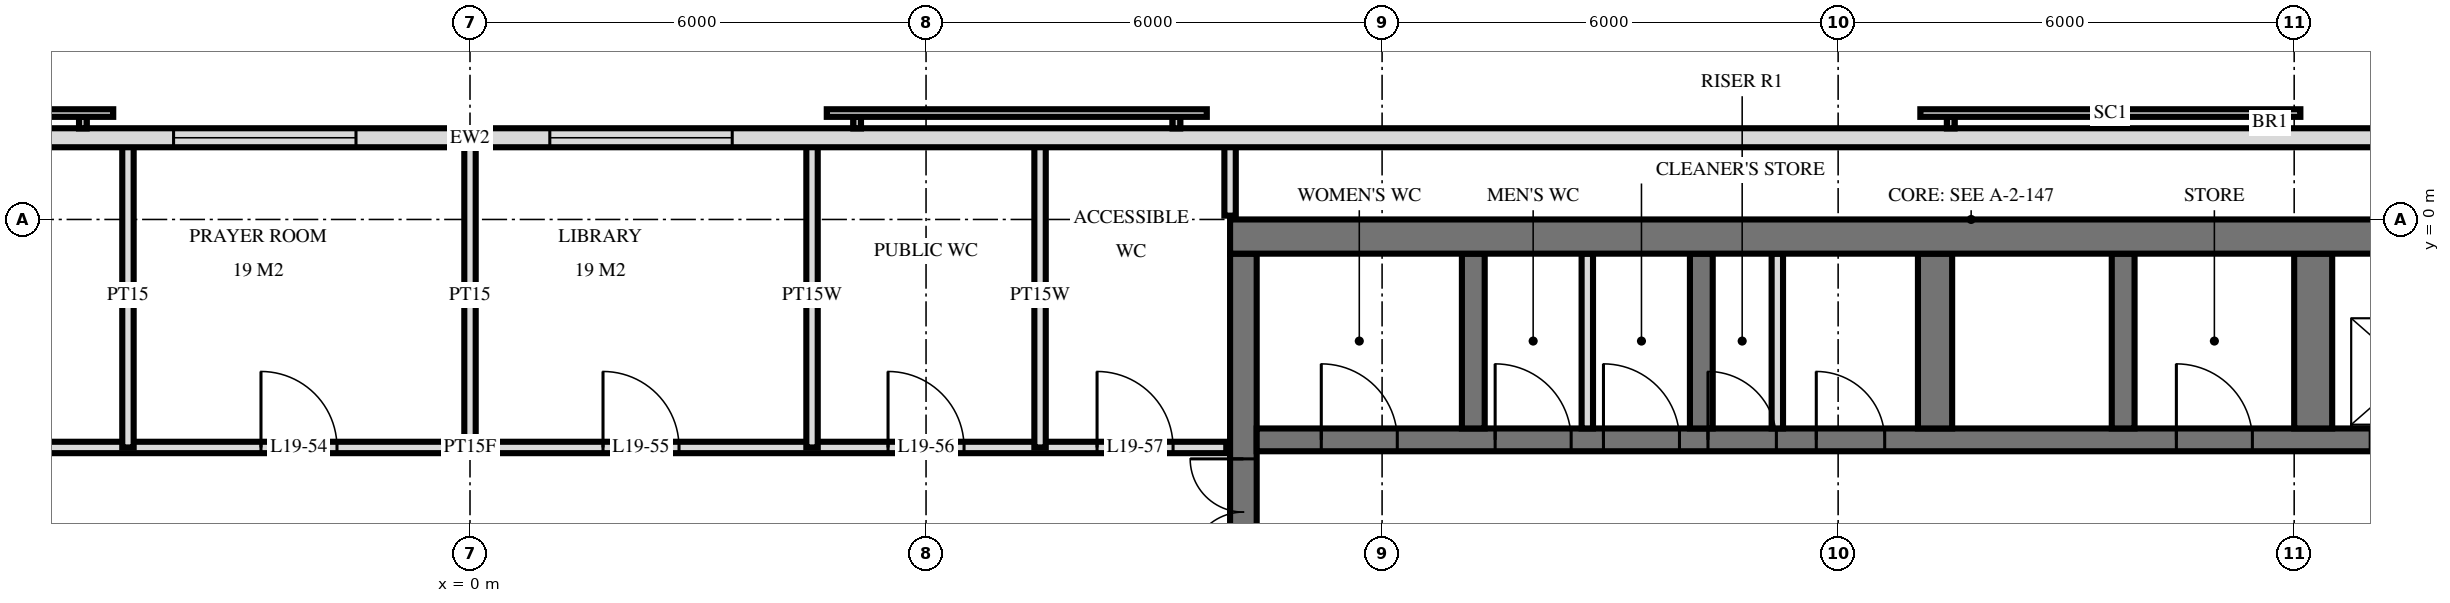
"""IFC4 building model, lengths in metres.
Left out: names, types, materials, properties, quantities, classifications, styles, units other than length and angle.
Written with IfcOpenShell. Run it as: python <this file> out.ifc"""

import sys

from ifc_helpers import new_model, si_unit, direction, frame, frame_2d, origin, place, context, subcontext, project, spatial, rectangle, extrude, element, fill, save


model = new_model("IFC4")
c1 = context("Model", 3, precision=1e-05, world=origin(), true_north=direction((0.0, 1.0)))
c2 = subcontext(c1, "Body", "Model", "MODEL_VIEW")
j1 = project(units=[si_unit("LENGTHUNIT", "METRE"), si_unit("PLANEANGLEUNIT", "RADIAN")], contexts=[c1])
p1 = place(None, origin())
s1 = spatial("IfcSite", under=j1, at=p1, CompositionType="ELEMENT")
p2 = place(p1, origin())
s2 = spatial("IfcBuilding", under=s1, at=p2, CompositionType="ELEMENT")
p3 = place(p2, frame((0.0, 0.0, 78.0)))
s3 = spatial("IfcBuildingStorey", under=s2, at=p3, CompositionType="ELEMENT", Elevation=78.0)
p4 = place(p3, frame((10.0, -0.225, 0.0), z_axis=(0.0, 0.0, 1.0), x_axis=(1.0, 0.0, 0.0)))
e1 = element("IfcWall", 1, at=p4, inside=s3, PredefinedType="SHEAR", context=c2, shape_type="SweptSolid", body=[
    extrude(rectangle(XDim=19.5, YDim=0.45, at=frame_2d((9.75, 0.0))), origin(), (0.0, 0.0, 1.0), 3.6),
])
p5 = place(p3, frame((10.175, -14.55, 0.0), z_axis=(0.0, 0.0, 1.0), x_axis=(0.0, 1.0, 0.0)))
e2 = element("IfcWall", 2, at=p5, inside=s3, PredefinedType="SHEAR", context=c2, shape_type="SweptSolid", body=[
    extrude(rectangle(XDim=14.1, YDim=0.35, at=frame_2d((7.05, 0.0))), origin(), (0.0, 0.0, 1.0), 3.6),
])
p6 = place(p5, frame((8.4, 0.0, 0.0)))
e3 = element("IfcOpeningElement", 3, at=p6, cuts=e2, PredefinedType="OPENING", context=c2, shape_type="SweptSolid", body=[
    extrude(rectangle(XDim=1.4, YDim=2.4, at=frame_2d((0.7, 1.2))), frame((0.0, 0.185, 0.0), z_axis=(0.0, -1.0, 0.0), x_axis=(1.0, 0.0, 0.0)), (0.0, 0.0, 1.0), 0.37),
])
p7 = place(p5, frame((10.0, 0.0, 0.0)))
e4 = element("IfcOpeningElement", 4, at=p7, cuts=e2, PredefinedType="OPENING", context=c2, shape_type="SweptSolid", body=[
    extrude(rectangle(XDim=1.4, YDim=2.4, at=frame_2d((0.7, 1.2))), frame((0.0, 0.185, 0.0), z_axis=(0.0, -1.0, 0.0), x_axis=(1.0, 0.0, 0.0)), (0.0, 0.0, 1.0), 0.37),
])
p8 = place(p5, frame((4.0, 0.0, 0.0)))
e5 = element("IfcOpeningElement", 5, at=p8, cuts=e2, PredefinedType="OPENING", context=c2, shape_type="SweptSolid", body=[
    extrude(rectangle(XDim=1.2, YDim=2.1, at=frame_2d((0.6, 1.05))), frame((0.0, 0.185, 0.0), z_axis=(0.0, -1.0, 0.0), x_axis=(1.0, 0.0, 0.0)), (0.0, 0.0, 1.0), 0.37),
])
p9 = place(p3, frame((10.35, -2.9, 0.0), z_axis=(0.0, 0.0, 1.0), x_axis=(1.0, 0.0, 0.0)))
e6 = element("IfcWall", 6, at=p9, inside=s3, PredefinedType="SHEAR", context=c2, shape_type="SweptSolid", body=[
    extrude(rectangle(XDim=18.7, YDim=0.3, at=frame_2d((9.35, 0.0))), origin(), (0.0, 0.0, 1.0), 3.6),
])
p10 = place(p9, frame((14.65, 0.0, 0.0)))
e7 = element("IfcOpeningElement", 7, at=p10, cuts=e6, PredefinedType="OPENING", context=c2, shape_type="SweptSolid", body=[
    extrude(rectangle(XDim=1.1, YDim=2.1, at=frame_2d((0.55, 1.05))), frame((0.0, 0.16, 0.0), z_axis=(0.0, -1.0, 0.0), x_axis=(1.0, 0.0, 0.0)), (0.0, 0.0, 1.0), 0.32),
])
p11 = place(p9, frame((17.05, 0.0, 0.0)))
e8 = element("IfcOpeningElement", 8, at=p11, cuts=e6, PredefinedType="OPENING", context=c2, shape_type="SweptSolid", body=[
    extrude(rectangle(XDim=1.1, YDim=2.1, at=frame_2d((0.55, 1.05))), frame((0.0, 0.16, 0.0), z_axis=(0.0, -1.0, 0.0), x_axis=(1.0, 0.0, 0.0)), (0.0, 0.0, 1.0), 0.32),
])
p12 = place(p9, frame((5.938, 0.0, 0.0)))
e9 = element("IfcOpeningElement", 9, at=p12, cuts=e6, PredefinedType="OPENING", context=c2, shape_type="SweptSolid", body=[
    extrude(rectangle(XDim=0.9, YDim=2.1, at=frame_2d((0.45, 1.05))), frame((0.0, 0.16, 0.0), z_axis=(0.0, -1.0, 0.0), x_axis=(1.0, 0.0, 0.0)), (0.0, 0.0, 1.0), 0.32),
])
p13 = place(p9, frame((7.363, 0.0, 0.0)))
e10 = element("IfcOpeningElement", 10, at=p13, cuts=e6, PredefinedType="OPENING", context=c2, shape_type="SweptSolid", body=[
    extrude(rectangle(XDim=0.9, YDim=2.1, at=frame_2d((0.45, 1.05))), frame((0.0, 0.16, 0.0), z_axis=(0.0, -1.0, 0.0), x_axis=(1.0, 0.0, 0.0)), (0.0, 0.0, 1.0), 0.32),
])
p14 = place(p9, frame((0.85, 0.0, 0.0)))
e11 = element("IfcOpeningElement", 11, at=p14, cuts=e6, PredefinedType="OPENING", context=c2, shape_type="SweptSolid", body=[
    extrude(rectangle(XDim=1.0, YDim=2.1, at=frame_2d((0.5, 1.05))), frame((0.0, 0.16, 0.0), z_axis=(0.0, -1.0, 0.0), x_axis=(1.0, 0.0, 0.0)), (0.0, 0.0, 1.0), 0.32),
])
p15 = place(p9, frame((3.137, 0.0, 0.0)))
e12 = element("IfcOpeningElement", 12, at=p15, cuts=e6, PredefinedType="OPENING", context=c2, shape_type="SweptSolid", body=[
    extrude(rectangle(XDim=1.0, YDim=2.1, at=frame_2d((0.5, 1.05))), frame((0.0, 0.16, 0.0), z_axis=(0.0, -1.0, 0.0), x_axis=(1.0, 0.0, 0.0)), (0.0, 0.0, 1.0), 0.32),
])
p16 = place(p9, frame((4.562, 0.0, 0.0)))
e13 = element("IfcOpeningElement", 13, at=p16, cuts=e6, PredefinedType="OPENING", context=c2, shape_type="SweptSolid", body=[
    extrude(rectangle(XDim=1.0, YDim=2.1, at=frame_2d((0.5, 1.05))), frame((0.0, 0.16, 0.0), z_axis=(0.0, -1.0, 0.0), x_axis=(1.0, 0.0, 0.0)), (0.0, 0.0, 1.0), 0.32),
])
p17 = place(p9, frame((12.1, 0.0, 0.0)))
e14 = element("IfcOpeningElement", 14, at=p17, cuts=e6, PredefinedType="OPENING", context=c2, shape_type="SweptSolid", body=[
    extrude(rectangle(XDim=1.0, YDim=2.1, at=frame_2d((0.5, 1.05))), frame((0.0, 0.16, 0.0), z_axis=(0.0, -1.0, 0.0), x_axis=(1.0, 0.0, 0.0)), (0.0, 0.0, 1.0), 0.32),
])
for number, where, z_axis, x_axis in (
    (15, (13.2, -2.75, 0.0), (0.0, 0.0, 1.0), (0.0, 1.0, 0.0)),
    (16, (16.2, -2.75, 0.0), (0.0, 0.0, 1.0), (0.0, 1.0, 0.0)),
):
    element("IfcWall", number, at=place(p3, frame(where, z_axis=z_axis, x_axis=x_axis)), inside=s3, PredefinedType="SHEAR", context=c2, shape_type="SweptSolid", body=[
        extrude(rectangle(XDim=2.3, YDim=0.3, at=frame_2d((1.15, 0.0))), origin(), (0.0, 0.0, 1.0), 3.6),
    ])
p18 = place(p3, frame((19.275, -2.75, 0.0), z_axis=(0.0, 0.0, 1.0), x_axis=(0.0, 1.0, 0.0)))
e17 = element("IfcWall", 17, at=p18, inside=s3, PredefinedType="SHEAR", context=c2, shape_type="SweptSolid", body=[
    extrude(rectangle(XDim=2.3, YDim=0.45, at=frame_2d((1.15, 0.0))), origin(), (0.0, 0.0, 1.0), 3.6),
])
p19 = place(p3, frame((21.75, -2.75, 0.0), z_axis=(0.0, 0.0, 1.0), x_axis=(0.0, 1.0, 0.0)))
e18 = element("IfcWall", 18, at=p19, inside=s3, PredefinedType="SHEAR", context=c2, shape_type="SweptSolid", body=[
    extrude(rectangle(XDim=2.3, YDim=0.3, at=frame_2d((1.15, 0.0))), origin(), (0.0, 0.0, 1.0), 3.6),
])
p20 = place(p3, frame((24.25, -2.75, 0.0), z_axis=(0.0, 0.0, 1.0), x_axis=(0.0, 1.0, 0.0)))
e19 = element("IfcWall", 19, at=p20, inside=s3, PredefinedType="SHEAR", context=c2, shape_type="SweptSolid", body=[
    extrude(rectangle(XDim=2.3, YDim=0.5, at=frame_2d((1.15, 0.0))), origin(), (0.0, 0.0, 1.0), 3.6),
])
p21 = place(p3, frame((28.775, 1.075, 0.0), z_axis=(0.0, 0.0, 1.0), x_axis=(-1.0, 0.0, 0.0)))
e20 = element("IfcWall", 20, at=p21, inside=s3, PredefinedType="SOLIDWALL", context=c2, shape_type="SweptSolid", body=[
    extrude(rectangle(XDim=57.551, YDim=0.25, at=frame_2d((28.775, 0.0))), origin(), (0.0, 0.0, 1.0), 3.32),
])
p22 = place(p21, frame((25.325, 0.0, 0.3)))
e21 = element("IfcOpeningElement", 21, at=p22, cuts=e20, PredefinedType="OPENING", context=c2, shape_type="SweptSolid", body=[
    extrude(rectangle(XDim=2.4, YDim=2.1, at=frame_2d((1.2, 1.05))), frame((0.0, 0.135, 0.0), z_axis=(0.0, -1.0, 0.0), x_axis=(1.0, 0.0, 0.0)), (0.0, 0.0, 1.0), 0.27),
])
p23 = place(p21, frame((30.275, 0.0, 0.3)))
e22 = element("IfcOpeningElement", 22, at=p23, cuts=e20, PredefinedType="OPENING", context=c2, shape_type="SweptSolid", body=[
    extrude(rectangle(XDim=2.4, YDim=2.1, at=frame_2d((1.2, 1.05))), frame((0.0, 0.135, 0.0), z_axis=(0.0, -1.0, 0.0), x_axis=(1.0, 0.0, 0.0)), (0.0, 0.0, 1.0), 0.27),
])
p24 = place(p21, frame((34.825, 0.0, 0.3)))
e23 = element("IfcOpeningElement", 23, at=p24, cuts=e20, PredefinedType="OPENING", context=c2, shape_type="SweptSolid", body=[
    extrude(rectangle(XDim=2.4, YDim=2.1, at=frame_2d((1.2, 1.05))), frame((0.0, 0.135, 0.0), z_axis=(0.0, -1.0, 0.0), x_axis=(1.0, 0.0, 0.0)), (0.0, 0.0, 1.0), 0.27),
])
for number, where, z_axis, x_axis in (
    (24, (17.2, -2.75, 0.0), (0.0, 0.0, 1.0), (0.0, 1.0, 0.0)),
    (25, (14.7, -2.75, 0.0), (0.0, 0.0, 1.0), (0.0, 1.0, 0.0)),
):
    element("IfcWall", number, at=place(p3, frame(where, z_axis=z_axis, x_axis=x_axis)), inside=s3, PredefinedType="PARTITIONING", context=c2, shape_type="SweptSolid", body=[
        extrude(rectangle(XDim=2.3, YDim=0.15, at=frame_2d((1.15, 0.0))), origin(), (0.0, 0.0, 1.0), 3.3),
    ])
p25 = place(p3, frame((10.0, 0.05, 0.0), z_axis=(0.0, 0.0, 1.0), x_axis=(0.0, 1.0, 0.0)))
e26 = element("IfcWall", 26, at=p25, inside=s3, PredefinedType="PLUMBINGWALL", context=c2, shape_type="SweptSolid", body=[
    extrude(rectangle(XDim=0.97, YDim=0.15, at=frame_2d((0.485, 0.0))), origin(), (0.0, 0.0, 1.0), 3.32),
])
for number, where, z_axis, x_axis in (
    (27, (7.5, -3.0, 0.0), (0.0, 0.0, 1.0), (0.0, 1.0, 0.0)),
    (28, (4.5, -3.0, 0.0), (0.0, 0.0, 1.0), (0.0, 1.0, 0.0)),
):
    element("IfcWall", number, at=place(p3, frame(where, z_axis=z_axis, x_axis=x_axis)), inside=s3, PredefinedType="PLUMBINGWALL", context=c2, shape_type="SweptSolid", body=[
        extrude(rectangle(XDim=4.02, YDim=0.15, at=frame_2d((2.01, 0.0))), origin(), (0.0, 0.0, 1.0), 3.32),
    ])
for number, where, z_axis, x_axis in (
    (29, (0.0, -3.0, 0.0), (0.0, 0.0, 1.0), (0.0, 1.0, 0.0)),
    (30, (-4.5, -3.0, 0.0), (0.0, 0.0, 1.0), (0.0, 1.0, 0.0)),
):
    element("IfcWall", number, at=place(p3, frame(where, z_axis=z_axis, x_axis=x_axis)), inside=s3, PredefinedType="PARTITIONING", context=c2, shape_type="SweptSolid", body=[
        extrude(rectangle(XDim=4.02, YDim=0.15, at=frame_2d((2.01, 0.0))), origin(), (0.0, 0.0, 1.0), 3.32),
    ])
p26 = place(p3, frame((-9.95, -3.0, 0.0), z_axis=(0.0, 0.0, 1.0), x_axis=(1.0, 0.0, 0.0)))
e31 = element("IfcWall", 31, at=p26, inside=s3, PredefinedType="PARTITIONING", context=c2, shape_type="SweptSolid", body=[
    extrude(rectangle(XDim=19.9, YDim=0.15, at=frame_2d((9.95, 0.0))), origin(), (0.0, 0.0, 1.0), 3.32),
])
p27 = place(p26, frame((2.2, 0.0, 0.0)))
e32 = element("IfcOpeningElement", 32, at=p27, cuts=e31, PredefinedType="OPENING", context=c2, shape_type="SweptSolid", body=[
    extrude(rectangle(XDim=1.0, YDim=2.1, at=frame_2d((0.5, 1.05))), frame((0.0, 0.085, 0.0), z_axis=(0.0, -1.0, 0.0), x_axis=(1.0, 0.0, 0.0)), (0.0, 0.0, 1.0), 0.17),
])
p28 = place(p26, frame((7.2, 0.0, 0.0)))
e33 = element("IfcOpeningElement", 33, at=p28, cuts=e31, PredefinedType="OPENING", context=c2, shape_type="SweptSolid", body=[
    extrude(rectangle(XDim=1.0, YDim=2.1, at=frame_2d((0.5, 1.05))), frame((0.0, 0.085, 0.0), z_axis=(0.0, -1.0, 0.0), x_axis=(1.0, 0.0, 0.0)), (0.0, 0.0, 1.0), 0.17),
])
p29 = place(p26, frame((11.7, 0.0, 0.0)))
e34 = element("IfcOpeningElement", 34, at=p29, cuts=e31, PredefinedType="OPENING", context=c2, shape_type="SweptSolid", body=[
    extrude(rectangle(XDim=1.0, YDim=2.1, at=frame_2d((0.5, 1.05))), frame((0.0, 0.085, 0.0), z_axis=(0.0, -1.0, 0.0), x_axis=(1.0, 0.0, 0.0)), (0.0, 0.0, 1.0), 0.17),
])
p30 = place(p26, frame((15.45, 0.0, 0.0)))
e35 = element("IfcOpeningElement", 35, at=p30, cuts=e31, PredefinedType="OPENING", context=c2, shape_type="SweptSolid", body=[
    extrude(rectangle(XDim=1.0, YDim=2.1, at=frame_2d((0.5, 1.05))), frame((0.0, 0.085, 0.0), z_axis=(0.0, -1.0, 0.0), x_axis=(1.0, 0.0, 0.0)), (0.0, 0.0, 1.0), 0.17),
])
p31 = place(p26, frame((18.2, 0.0, 0.0)))
e36 = element("IfcOpeningElement", 36, at=p31, cuts=e31, PredefinedType="OPENING", context=c2, shape_type="SweptSolid", body=[
    extrude(rectangle(XDim=1.0, YDim=2.1, at=frame_2d((0.5, 1.05))), frame((0.0, 0.085, 0.0), z_axis=(0.0, -1.0, 0.0), x_axis=(1.0, 0.0, 0.0)), (0.0, 0.0, 1.0), 0.17),
])
p32 = place(p22, origin())
e37 = element("IfcWindow", 37, at=p32, inside=s3, PartitioningType="SINGLE_PANEL", PredefinedType="WINDOW", context=c2, shape_type="SweptSolid", body=[
    extrude(rectangle(XDim=2.4, YDim=2.1, at=frame_2d((1.2, 1.05))), frame((0.0, 0.03, 0.0), z_axis=(0.0, -1.0, 0.0), x_axis=(1.0, 0.0, 0.0)), (0.0, 0.0, 1.0), 0.06),
])
fill(e21, e37)
p33 = place(p23, origin())
e38 = element("IfcWindow", 38, at=p33, inside=s3, PartitioningType="SINGLE_PANEL", PredefinedType="WINDOW", context=c2, shape_type="SweptSolid", body=[
    extrude(rectangle(XDim=2.4, YDim=2.1, at=frame_2d((1.2, 1.05))), frame((0.0, 0.03, 0.0), z_axis=(0.0, -1.0, 0.0), x_axis=(1.0, 0.0, 0.0)), (0.0, 0.0, 1.0), 0.06),
])
fill(e22, e38)
p34 = place(p7, origin())
e39 = element("IfcDoor", 39, at=p34, inside=s3, OperationType="DOUBLE_DOOR_SINGLE_SWING", PredefinedType="DOOR", context=c2, shape_type="SweptSolid", body=[
    extrude(rectangle(XDim=1.4, YDim=2.4, at=frame_2d((0.7, 1.2))), frame((0.0, 0.025, 0.0), z_axis=(0.0, -1.0, 0.0), x_axis=(1.0, 0.0, 0.0)), (0.0, 0.0, 1.0), 0.05),
])
fill(e4, e39)
p35 = place(p12, origin())
e40 = element("IfcDoor", 40, at=p35, inside=s3, OperationType="SINGLE_SWING_RIGHT", PredefinedType="DOOR", context=c2, shape_type="SweptSolid", body=[
    extrude(rectangle(XDim=0.9, YDim=2.1, at=frame_2d((0.45, 1.05))), frame((0.0, 0.025, 0.0), z_axis=(0.0, -1.0, 0.0), x_axis=(1.0, 0.0, 0.0)), (0.0, 0.0, 1.0), 0.05),
])
fill(e9, e40)
p36 = place(p13, origin())
e41 = element("IfcDoor", 41, at=p36, inside=s3, OperationType="SINGLE_SWING_RIGHT", PredefinedType="DOOR", context=c2, shape_type="SweptSolid", body=[
    extrude(rectangle(XDim=0.9, YDim=2.1, at=frame_2d((0.45, 1.05))), frame((0.0, 0.025, 0.0), z_axis=(0.0, -1.0, 0.0), x_axis=(1.0, 0.0, 0.0)), (0.0, 0.0, 1.0), 0.05),
])
fill(e10, e41)
p37 = place(p14, origin())
e42 = element("IfcDoor", 42, at=p37, inside=s3, OperationType="SINGLE_SWING_RIGHT", PredefinedType="DOOR", context=c2, shape_type="SweptSolid", body=[
    extrude(rectangle(XDim=1.0, YDim=2.1, at=frame_2d((0.5, 1.05))), frame((0.0, 0.025, 0.0), z_axis=(0.0, -1.0, 0.0), x_axis=(1.0, 0.0, 0.0)), (0.0, 0.0, 1.0), 0.05),
])
fill(e11, e42)
p38 = place(p15, origin())
e43 = element("IfcDoor", 43, at=p38, inside=s3, OperationType="SINGLE_SWING_RIGHT", PredefinedType="DOOR", context=c2, shape_type="SweptSolid", body=[
    extrude(rectangle(XDim=1.0, YDim=2.1, at=frame_2d((0.5, 1.05))), frame((0.0, 0.025, 0.0), z_axis=(0.0, -1.0, 0.0), x_axis=(1.0, 0.0, 0.0)), (0.0, 0.0, 1.0), 0.05),
])
fill(e12, e43)
p39 = place(p16, origin())
e44 = element("IfcDoor", 44, at=p39, inside=s3, OperationType="SINGLE_SWING_RIGHT", PredefinedType="DOOR", context=c2, shape_type="SweptSolid", body=[
    extrude(rectangle(XDim=1.0, YDim=2.1, at=frame_2d((0.5, 1.05))), frame((0.0, 0.025, 0.0), z_axis=(0.0, -1.0, 0.0), x_axis=(1.0, 0.0, 0.0)), (0.0, 0.0, 1.0), 0.05),
])
fill(e13, e44)
p40 = place(p17, origin())
e45 = element("IfcDoor", 45, at=p40, inside=s3, OperationType="SINGLE_SWING_RIGHT", PredefinedType="DOOR", context=c2, shape_type="SweptSolid", body=[
    extrude(rectangle(XDim=1.0, YDim=2.1, at=frame_2d((0.5, 1.05))), frame((0.0, 0.025, 0.0), z_axis=(0.0, -1.0, 0.0), x_axis=(1.0, 0.0, 0.0)), (0.0, 0.0, 1.0), 0.05),
])
fill(e14, e45)
p41 = place(p28, origin())
e46 = element("IfcDoor", 46, at=p41, inside=s3, OperationType="SINGLE_SWING_RIGHT", PredefinedType="DOOR", context=c2, shape_type="SweptSolid", body=[
    extrude(rectangle(XDim=1.0, YDim=2.1, at=frame_2d((0.5, 1.05))), frame((0.0, 0.025, 0.0), z_axis=(0.0, -1.0, 0.0), x_axis=(1.0, 0.0, 0.0)), (0.0, 0.0, 1.0), 0.05),
])
fill(e33, e46)
p42 = place(p29, origin())
e47 = element("IfcDoor", 47, at=p42, inside=s3, OperationType="SINGLE_SWING_RIGHT", PredefinedType="DOOR", context=c2, shape_type="SweptSolid", body=[
    extrude(rectangle(XDim=1.0, YDim=2.1, at=frame_2d((0.5, 1.05))), frame((0.0, 0.025, 0.0), z_axis=(0.0, -1.0, 0.0), x_axis=(1.0, 0.0, 0.0)), (0.0, 0.0, 1.0), 0.05),
])
fill(e34, e47)
p43 = place(p30, origin())
e48 = element("IfcDoor", 48, at=p43, inside=s3, OperationType="SINGLE_SWING_RIGHT", PredefinedType="DOOR", context=c2, shape_type="SweptSolid", body=[
    extrude(rectangle(XDim=1.0, YDim=2.1, at=frame_2d((0.5, 1.05))), frame((0.0, 0.025, 0.0), z_axis=(0.0, -1.0, 0.0), x_axis=(1.0, 0.0, 0.0)), (0.0, 0.0, 1.0), 0.05),
])
fill(e35, e48)
p44 = place(p31, origin())
e49 = element("IfcDoor", 49, at=p44, inside=s3, OperationType="SINGLE_SWING_RIGHT", PredefinedType="DOOR", context=c2, shape_type="SweptSolid", body=[
    extrude(rectangle(XDim=1.0, YDim=2.1, at=frame_2d((0.5, 1.05))), frame((0.0, 0.025, 0.0), z_axis=(0.0, -1.0, 0.0), x_axis=(1.0, 0.0, 0.0)), (0.0, 0.0, 1.0), 0.05),
])
fill(e36, e49)
save(model, sys.argv[1])
